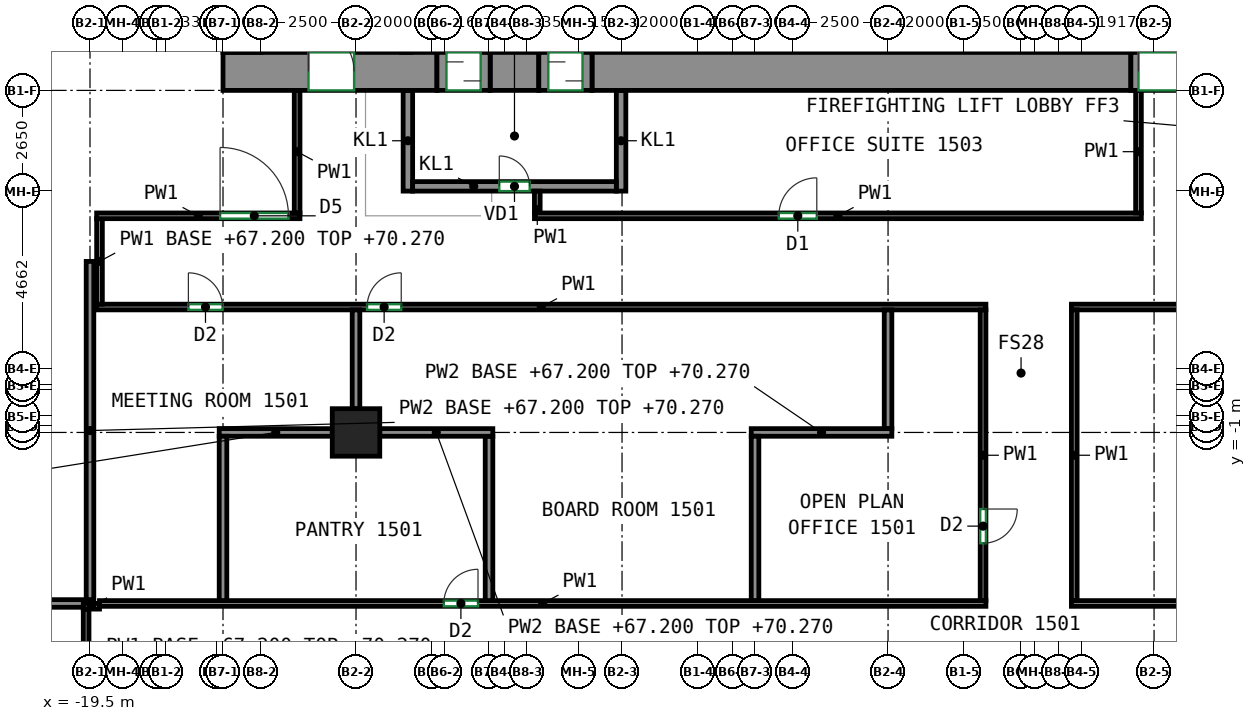
"""IFC4 building model, lengths in metres.
Left out: names, types, materials, properties, quantities, classifications, styles, units other than length and angle.
Written with IfcOpenShell. Run it as: python <this file> out.ifc"""

import sys

from ifc_helpers import new_model, si_unit, direction, frame, frame_2d, origin, origin_2d, place, context, subcontext, project, spatial, rectangle, extrude, source, transform, mapped, element, fill, save


model = new_model("IFC4")
c1 = context("Model", 3, precision=1e-05, world=origin(), true_north=direction((0.0, 1.0)))
c2 = subcontext(c1, "Body", "Model", "MODEL_VIEW")
j1 = project(units=[si_unit("LENGTHUNIT", "METRE"), si_unit("PLANEANGLEUNIT", "RADIAN")], contexts=[c1])
p1 = place(None, origin())
s1 = spatial("IfcSite", under=j1, at=p1, CompositionType="ELEMENT")
p2 = place(p1, origin())
s2 = spatial("IfcBuilding", under=s1, at=p2, CompositionType="ELEMENT")
p3 = place(p2, frame((0.0, 0.0, 67.2)))
s3 = spatial("IfcBuildingStorey", under=s2, at=p3, CompositionType="ELEMENT", Elevation=67.2)
m1 = source(origin(), c2, "Body", "SweptSolid", [
    extrude(rectangle(XDim=1.25, YDim=1.25, at=origin_2d()), origin(), (0.0, 0.0, 1.0), 3.72),
])
p4 = place(p3, frame((-12.5, -1.0, 0.0), z_axis=(0.0, 0.0, 1.0), x_axis=(1.0, 0.0, 0.0)))
e1 = element("IfcColumn", 1, at=p4, inside=s3, PredefinedType="COLUMN", context=c2, shape_type="MappedRepresentation", body=[
    mapped(m1, transform((0.0, 0.0, 0.0))),
])
m2 = source(origin(), c2, "Body", "SweptSolid", [
    extrude(rectangle(XDim=5.63, YDim=1.0, at=frame_2d((2.815, 0.0))), origin(), (0.0, 0.0, 1.0), 3.72),
])
p5 = place(p3, frame((-16.0, 8.5, 0.0), z_axis=(0.0, 0.0, 1.0), x_axis=(1.0, 0.0, 0.0)))
e2 = element("IfcWall", 2, at=p5, inside=s3, PredefinedType="SHEAR", context=c2, shape_type="MappedRepresentation", body=[
    mapped(m2, transform((0.0, 0.0, 0.0))),
])
p6 = place(p5, frame((2.25, 0.0, 0.0)))
e3 = element("IfcOpeningElement", 3, at=p6, cuts=e2, PredefinedType="OPENING", context=c2, shape_type="SweptSolid", body=[
    extrude(rectangle(XDim=1.2, YDim=2.1, at=frame_2d((0.6, 1.05))), frame((0.0, 0.51, 0.0), z_axis=(0.0, -1.0, 0.0), x_axis=(1.0, 0.0, 0.0)), (0.0, 0.0, 1.0), 1.02),
])
m3 = source(origin(), c2, "Body", "SweptSolid", [
    extrude(rectangle(XDim=1.28, YDim=1.0, at=frame_2d((0.64, 0.0))), origin(), (0.0, 0.0, 1.0), 3.72),
])
p7 = place(p3, frame((-8.97, 8.5, 0.0), z_axis=(0.0, 0.0, 1.0), x_axis=(1.0, 0.0, 0.0)))
e4 = element("IfcWall", 4, at=p7, inside=s3, PredefinedType="SHEAR", context=c2, shape_type="MappedRepresentation", body=[
    mapped(m3, transform((0.0, 0.0, 0.0))),
])
m4 = source(origin(), c2, "Body", "SweptSolid", [
    extrude(rectangle(XDim=14.18, YDim=1.0, at=frame_2d((7.09, 0.0))), origin(), (0.0, 0.0, 1.0), 3.72),
])
p8 = place(p3, frame((-6.29, 8.5, 0.0), z_axis=(0.0, 0.0, 1.0), x_axis=(1.0, 0.0, 0.0)))
e5 = element("IfcWall", 5, at=p8, inside=s3, PredefinedType="SHEAR", context=c2, shape_type="MappedRepresentation", body=[
    mapped(m4, transform((0.0, 0.0, 0.0))),
])
m5 = source(origin(), c2, "Body", "SweptSolid", [
    extrude(rectangle(XDim=2.65, YDim=0.25, at=frame_2d((1.325, 0.0))), origin(), (0.0, 0.0, 1.0), 3.72),
])
for number, where, z_axis, x_axis in (
    (6, (-11.135, 5.35, 0.0), (0.0, 0.0, 1.0), (0.0, 1.0, 0.0)),
    (7, (-5.525, 5.35, 0.0), (0.0, 0.0, 1.0), (0.0, 1.0, 0.0)),
):
    element("IfcWall", number, at=place(p3, frame(where, z_axis=z_axis, x_axis=x_axis)), inside=s3, PredefinedType="PARTITIONING", context=c2, shape_type="MappedRepresentation", body=[
        mapped(m5, transform((0.0, 0.0, 0.0))),
    ])
m6 = source(origin(), c2, "Body", "SweptSolid", [
    extrude(rectangle(XDim=5.36, YDim=0.25, at=frame_2d((2.68, 0.0))), origin(), (0.0, 0.0, 1.0), 3.72),
])
p9 = place(p3, frame((-11.01, 5.475, 0.0), z_axis=(0.0, 0.0, 1.0), x_axis=(1.0, 0.0, 0.0)))
e8 = element("IfcWall", 8, at=p9, inside=s3, PredefinedType="PARTITIONING", context=c2, shape_type="MappedRepresentation", body=[
    mapped(m6, transform((0.0, 0.0, 0.0))),
])
p10 = place(p9, frame((2.28, 0.0, 0.0)))
e9 = element("IfcOpeningElement", 9, at=p10, cuts=e8, PredefinedType="OPENING", context=c2, shape_type="SweptSolid", body=[
    extrude(rectangle(XDim=0.8, YDim=2.0, at=frame_2d((0.4, 1.0))), frame((0.0, 0.135, 0.0), z_axis=(0.0, -1.0, 0.0), x_axis=(1.0, 0.0, 0.0)), (0.0, 0.0, 1.0), 0.27),
])
m7 = source(origin(), c2, "Body", "SweptSolid", [
    extrude(rectangle(XDim=1.4, YDim=1.0, at=frame_2d((0.7, 0.0))), origin(), (0.0, 0.0, 1.0), 2.7),
])
p11 = place(p3, frame((-10.37, 8.5, 0.0), z_axis=(0.0, 0.0, 1.0), x_axis=(1.0, 0.0, 0.0)))
e10 = element("IfcWall", 10, at=p11, inside=s3, PredefinedType="PARTITIONING", context=c2, shape_type="MappedRepresentation", body=[
    mapped(m7, transform((0.0, 0.0, 0.0))),
])
p12 = place(p11, frame((0.25, 0.0, 0.0)))
e11 = element("IfcOpeningElement", 11, at=p12, cuts=e10, PredefinedType="OPENING", context=c2, shape_type="SweptSolid", body=[
    extrude(rectangle(XDim=0.9, YDim=2.1, at=frame_2d((0.45, 1.05))), frame((0.0, 0.51, 0.0), z_axis=(0.0, -1.0, 0.0), x_axis=(1.0, 0.0, 0.0)), (0.0, 0.0, 1.0), 1.02),
])
m8 = source(origin(), c2, "Body", "SweptSolid", [
    extrude(rectangle(XDim=1.4, YDim=1.0, at=frame_2d((0.7, 0.0))), origin(), (0.0, 0.0, 1.0), 2.7),
])
p13 = place(p3, frame((-7.69, 8.5, 0.0), z_axis=(0.0, 0.0, 1.0), x_axis=(1.0, 0.0, 0.0)))
e12 = element("IfcWall", 12, at=p13, inside=s3, PredefinedType="PARTITIONING", context=c2, shape_type="MappedRepresentation", body=[
    mapped(m8, transform((0.0, 0.0, 0.0))),
])
p14 = place(p13, frame((0.25, 0.0, 0.0)))
e13 = element("IfcOpeningElement", 13, at=p14, cuts=e12, PredefinedType="OPENING", context=c2, shape_type="SweptSolid", body=[
    extrude(rectangle(XDim=0.9, YDim=2.1, at=frame_2d((0.45, 1.05))), frame((0.0, 0.51, 0.0), z_axis=(0.0, -1.0, 0.0), x_axis=(1.0, 0.0, 0.0)), (0.0, 0.0, 1.0), 1.02),
])
m9 = source(origin(), c2, "Body", "SweptSolid", [
    extrude(rectangle(XDim=2.4, YDim=1.0, at=frame_2d((1.2, 0.0))), origin(), (0.0, 0.0, 1.0), 2.7),
])
p15 = place(p3, frame((7.89, 8.5, 0.0), z_axis=(0.0, 0.0, 1.0), x_axis=(1.0, 0.0, 0.0)))
e14 = element("IfcWall", 14, at=p15, inside=s3, PredefinedType="PARTITIONING", context=c2, shape_type="MappedRepresentation", body=[
    mapped(m9, transform((0.0, 0.0, 0.0))),
])
p16 = place(p15, frame((0.2, 0.0, 0.0)))
e15 = element("IfcOpeningElement", 15, at=p16, cuts=e14, PredefinedType="OPENING", context=c2, shape_type="SweptSolid", body=[
    extrude(rectangle(XDim=2.0, YDim=2.1, at=frame_2d((1.0, 1.05))), frame((0.0, 0.51, 0.0), z_axis=(0.0, -1.0, 0.0), x_axis=(1.0, 0.0, 0.0)), (0.0, 0.0, 1.0), 1.02),
])
p17 = place(p3, frame((-19.25, -5.573, 0.0), z_axis=(0.0, 0.0, 1.0), x_axis=(-1.0, 0.0, 0.0)))
e16 = element("IfcWall", 16, at=p17, inside=s3, PredefinedType="PARTITIONING", context=c2, shape_type="SweptSolid", body=[
    extrude(rectangle(XDim=0.427, YDim=0.15, at=frame_2d((0.213, 0.0))), origin(), (0.0, 0.0, 1.0), 3.72),
])
p18 = place(p3, frame((-19.602, -7.652, 0.0), z_axis=(0.0, 0.0, 1.0), x_axis=(0.0, 1.0, 0.0)))
e17 = element("IfcWall", 17, at=p18, inside=s3, PredefinedType="PARTITIONING", context=c2, shape_type="SweptSolid", body=[
    extrude(rectangle(XDim=2.004, YDim=0.15, at=frame_2d((1.002, 0.0))), origin(), (0.0, 0.0, 1.0), 3.07),
])
p19 = place(p3, frame((-19.25, -5.5, 0.0), z_axis=(0.0, 0.0, 1.0), x_axis=(1.0, 0.0, 0.0)))
e18 = element("IfcWall", 18, at=p19, inside=s3, PredefinedType="PARTITIONING", context=c2, shape_type="SweptSolid", body=[
    extrude(rectangle(XDim=23.325, YDim=0.15, at=frame_2d((11.663, 0.0))), origin(), (0.0, 0.0, 1.0), 3.72),
])
p20 = place(p19, frame((9.06, 0.0, 0.0)))
e19 = element("IfcOpeningElement", 19, at=p20, cuts=e18, PredefinedType="OPENING", context=c2, shape_type="SweptSolid", body=[
    extrude(rectangle(XDim=0.9, YDim=2.1, at=frame_2d((0.45, 1.05))), frame((0.0, 0.085, 0.0), z_axis=(0.0, -1.0, 0.0), x_axis=(1.0, 0.0, 0.0)), (0.0, 0.0, 1.0), 0.17),
])
p21 = place(p3, frame((-19.325, 2.3, 0.0), z_axis=(0.0, 0.0, 1.0), x_axis=(1.0, 0.0, 0.0)))
e20 = element("IfcWall", 20, at=p21, inside=s3, PredefinedType="PARTITIONING", context=c2, shape_type="SweptSolid", body=[
    extrude(rectangle(XDim=23.4, YDim=0.15, at=frame_2d((11.7, 0.0))), origin(), (0.0, 0.0, 1.0), 3.72),
])
p22 = place(p21, frame((2.414, 0.0, 0.0)))
e21 = element("IfcOpeningElement", 21, at=p22, cuts=e20, PredefinedType="OPENING", context=c2, shape_type="SweptSolid", body=[
    extrude(rectangle(XDim=0.9, YDim=2.1, at=frame_2d((0.45, 1.05))), frame((0.0, 0.085, 0.0), z_axis=(0.0, -1.0, 0.0), x_axis=(1.0, 0.0, 0.0)), (0.0, 0.0, 1.0), 0.17),
])
p23 = place(p21, frame((7.115, 0.0, 0.0)))
e22 = element("IfcOpeningElement", 22, at=p23, cuts=e20, PredefinedType="OPENING", context=c2, shape_type="SweptSolid", body=[
    extrude(rectangle(XDim=0.9, YDim=2.1, at=frame_2d((0.45, 1.05))), frame((0.0, 0.085, 0.0), z_axis=(0.0, -1.0, 0.0), x_axis=(1.0, 0.0, 0.0)), (0.0, 0.0, 1.0), 0.17),
])
p24 = place(p3, frame((-19.25, 2.375, 0.0), z_axis=(0.0, 0.0, 1.0), x_axis=(0.0, 1.0, 0.0)))
e23 = element("IfcWall", 23, at=p24, inside=s3, PredefinedType="PARTITIONING", context=c2, shape_type="SweptSolid", body=[
    extrude(rectangle(XDim=2.25, YDim=0.15, at=frame_2d((1.125, 0.0))), origin(), (0.0, 0.0, 1.0), 3.07),
])
p25 = place(p3, frame((-19.325, 4.7, 0.0), z_axis=(0.0, 0.0, 1.0), x_axis=(1.0, 0.0, 0.0)))
e24 = element("IfcWall", 24, at=p25, inside=s3, PredefinedType="PARTITIONING", context=c2, shape_type="SweptSolid", body=[
    extrude(rectangle(XDim=5.35, YDim=0.15, at=frame_2d((2.675, 0.0))), origin(), (0.0, 0.0, 1.0), 3.72),
])
p26 = place(p25, frame((3.248, 0.0, 0.0)))
e25 = element("IfcOpeningElement", 25, at=p26, cuts=e24, PredefinedType="OPENING", context=c2, shape_type="SweptSolid", body=[
    extrude(rectangle(XDim=1.8, YDim=2.1, at=frame_2d((0.9, 1.05))), frame((0.0, 0.085, 0.0), z_axis=(0.0, -1.0, 0.0), x_axis=(1.0, 0.0, 0.0)), (0.0, 0.0, 1.0), 0.17),
])
p27 = place(p3, frame((-14.05, 8.0, 0.0), z_axis=(0.0, 0.0, 1.0), x_axis=(0.0, -1.0, 0.0)))
e26 = element("IfcWall", 26, at=p27, inside=s3, PredefinedType="PARTITIONING", context=c2, shape_type="SweptSolid", body=[
    extrude(rectangle(XDim=3.225, YDim=0.15, at=frame_2d((1.613, 0.0))), origin(), (0.0, 0.0, 1.0), 3.72),
])
p28 = place(p3, frame((-7.73, 4.775, 0.0), z_axis=(0.0, 0.0, 1.0), x_axis=(0.0, 1.0, 0.0)))
e27 = element("IfcWall", 27, at=p28, inside=s3, PredefinedType="PARTITIONING", context=c2, shape_type="SweptSolid", body=[
    extrude(rectangle(XDim=0.575, YDim=0.15, at=frame_2d((0.288, 0.0))), origin(), (0.0, 0.0, 1.0), 3.72),
])
p29 = place(p3, frame((-7.805, 4.7, 0.0), z_axis=(0.0, 0.0, 1.0), x_axis=(1.0, 0.0, 0.0)))
e28 = element("IfcWall", 28, at=p29, inside=s3, PredefinedType="PARTITIONING", context=c2, shape_type="SweptSolid", body=[
    extrude(rectangle(XDim=15.97, YDim=0.15, at=frame_2d((7.985, 0.0))), origin(), (0.0, 0.0, 1.0), 3.72),
])
p30 = place(p29, frame((6.43, 0.0, 0.0)))
e29 = element("IfcOpeningElement", 29, at=p30, cuts=e28, PredefinedType="OPENING", context=c2, shape_type="SweptSolid", body=[
    extrude(rectangle(XDim=1.0, YDim=2.1, at=frame_2d((0.5, 1.05))), frame((0.0, 0.085, 0.0), z_axis=(0.0, -1.0, 0.0), x_axis=(1.0, 0.0, 0.0)), (0.0, 0.0, 1.0), 0.17),
])
p31 = place(p3, frame((8.09, 8.0, 0.0), z_axis=(0.0, 0.0, 1.0), x_axis=(0.0, -1.0, 0.0)))
e30 = element("IfcWall", 30, at=p31, inside=s3, PredefinedType="PARTITIONING", context=c2, shape_type="SweptSolid", body=[
    extrude(rectangle(XDim=3.225, YDim=0.15, at=frame_2d((1.613, 0.0))), origin(), (0.0, 0.0, 1.0), 3.72),
])
p32 = place(p3, frame((4.0, 2.225, 0.0), z_axis=(0.0, 0.0, 1.0), x_axis=(0.0, -1.0, 0.0)))
e31 = element("IfcWall", 31, at=p32, inside=s3, PredefinedType="PARTITIONING", context=c2, shape_type="SweptSolid", body=[
    extrude(rectangle(XDim=7.65, YDim=0.15, at=frame_2d((3.825, 0.0))), origin(), (0.0, 0.0, 1.0), 3.72),
])
p33 = place(p32, frame((5.24, 0.0, 0.0)))
e32 = element("IfcOpeningElement", 32, at=p33, cuts=e31, PredefinedType="OPENING", context=c2, shape_type="SweptSolid", body=[
    extrude(rectangle(XDim=0.9, YDim=2.1, at=frame_2d((0.45, 1.05))), frame((0.0, 0.085, 0.0), z_axis=(0.0, -1.0, 0.0), x_axis=(1.0, 0.0, 0.0)), (0.0, 0.0, 1.0), 0.17),
])
p34 = place(p3, frame((6.325, 2.3, 0.0), z_axis=(0.0, 0.0, 1.0), x_axis=(1.0, 0.0, 0.0)))
e33 = element("IfcWall", 33, at=p34, inside=s3, PredefinedType="PARTITIONING", context=c2, shape_type="SweptSolid", body=[
    extrude(rectangle(XDim=23.0, YDim=0.15, at=frame_2d((11.5, 0.0))), origin(), (0.0, 0.0, 1.0), 3.72),
])
p35 = place(p34, frame((9.443, 0.0, 0.0)))
e34 = element("IfcOpeningElement", 34, at=p35, cuts=e33, PredefinedType="OPENING", context=c2, shape_type="SweptSolid", body=[
    extrude(rectangle(XDim=1.0, YDim=2.1, at=frame_2d((0.5, 1.05))), frame((0.0, 0.085, 0.0), z_axis=(0.0, -1.0, 0.0), x_axis=(1.0, 0.0, 0.0)), (0.0, 0.0, 1.0), 0.17),
])
p36 = place(p34, frame((20.381, 0.0, 0.0)))
e35 = element("IfcOpeningElement", 35, at=p36, cuts=e33, PredefinedType="OPENING", context=c2, shape_type="SweptSolid", body=[
    extrude(rectangle(XDim=1.8, YDim=2.1, at=frame_2d((0.9, 1.05))), frame((0.0, 0.085, 0.0), z_axis=(0.0, -1.0, 0.0), x_axis=(1.0, 0.0, 0.0)), (0.0, 0.0, 1.0), 0.17),
])
p37 = place(p3, frame((6.4, -5.425, 0.0), z_axis=(0.0, 0.0, 1.0), x_axis=(0.0, 1.0, 0.0)))
e36 = element("IfcWall", 36, at=p37, inside=s3, PredefinedType="PARTITIONING", context=c2, shape_type="SweptSolid", body=[
    extrude(rectangle(XDim=7.65, YDim=0.15, at=frame_2d((3.825, 0.0))), origin(), (0.0, 0.0, 1.0), 3.72),
])
p38 = place(p3, frame((6.325, -5.5, 0.0), z_axis=(0.0, 0.0, 1.0), x_axis=(1.0, 0.0, 0.0)))
e37 = element("IfcWall", 37, at=p38, inside=s3, PredefinedType="PARTITIONING", context=c2, shape_type="SweptSolid", body=[
    extrude(rectangle(XDim=23.0, YDim=0.15, at=frame_2d((11.5, 0.0))), origin(), (0.0, 0.0, 1.0), 3.72),
])
p39 = place(p3, frame((-19.677, -5.5, 0.0), z_axis=(0.0, 0.0, 1.0), x_axis=(-1.0, 0.0, 0.0)))
e38 = element("IfcWall", 38, at=p39, inside=s3, PredefinedType="PARTITIONING", context=c2, shape_type="SweptSolid", body=[
    extrude(rectangle(XDim=3.073, YDim=0.2, at=frame_2d((1.537, 0.0))), origin(), (0.0, 0.0, 1.0), 3.72),
])
p40 = place(p3, frame((-19.5, 3.5, 0.0), z_axis=(0.0, 0.0, 1.0), x_axis=(0.0, -1.0, 0.0)))
e39 = element("IfcWall", 39, at=p40, inside=s3, PredefinedType="PARTITIONING", context=c2, shape_type="SweptSolid", body=[
    extrude(rectangle(XDim=8.9, YDim=0.2, at=frame_2d((4.45, 0.0))), origin(), (0.0, 0.0, 1.0), 3.07),
])
p41 = place(p3, frame((-16.1, -1.0, 0.0), z_axis=(0.0, 0.0, 1.0), x_axis=(1.0, 0.0, 0.0)))
e40 = element("IfcWall", 40, at=p41, inside=s3, PredefinedType="PARTITIONING", context=c2, shape_type="SweptSolid", body=[
    extrude(rectangle(XDim=2.975, YDim=0.2, at=frame_2d((1.488, 0.0))), origin(), (0.0, 0.0, 1.0), 3.07),
])
p42 = place(p3, frame((-16.0, -5.424, 0.0), z_axis=(0.0, 0.0, 1.0), x_axis=(0.0, 1.0, 0.0)))
e41 = element("IfcWall", 41, at=p42, inside=s3, PredefinedType="PARTITIONING", context=c2, shape_type="SweptSolid", body=[
    extrude(rectangle(XDim=4.324, YDim=0.2, at=frame_2d((2.162, 0.0))), origin(), (0.0, 0.0, 1.0), 3.72),
])
p43 = place(p3, frame((-12.5, -0.375, 0.0), z_axis=(0.0, 0.0, 1.0), x_axis=(0.0, 1.0, 0.0)))
e42 = element("IfcWall", 42, at=p43, inside=s3, PredefinedType="PARTITIONING", context=c2, shape_type="SweptSolid", body=[
    extrude(rectangle(XDim=2.599, YDim=0.2, at=frame_2d((1.3, 0.0))), origin(), (0.0, 0.0, 1.0), 3.72),
])
p44 = place(p3, frame((-9.0, -5.424, 0.0), z_axis=(0.0, 0.0, 1.0), x_axis=(0.0, 1.0, 0.0)))
e43 = element("IfcWall", 43, at=p44, inside=s3, PredefinedType="PARTITIONING", context=c2, shape_type="SweptSolid", body=[
    extrude(rectangle(XDim=4.324, YDim=0.2, at=frame_2d((2.162, 0.0))), origin(), (0.0, 0.0, 1.0), 3.72),
])
p45 = place(p3, frame((-11.875, -1.0, 0.0), z_axis=(0.0, 0.0, 1.0), x_axis=(1.0, 0.0, 0.0)))
e44 = element("IfcWall", 44, at=p45, inside=s3, PredefinedType="PARTITIONING", context=c2, shape_type="SweptSolid", body=[
    extrude(rectangle(XDim=2.975, YDim=0.2, at=frame_2d((1.488, 0.0))), origin(), (0.0, 0.0, 1.0), 3.07),
])
p46 = place(p3, frame((1.5, -0.9, 0.0), z_axis=(0.0, 0.0, 1.0), x_axis=(0.0, 1.0, 0.0)))
e45 = element("IfcWall", 45, at=p46, inside=s3, PredefinedType="PARTITIONING", context=c2, shape_type="SweptSolid", body=[
    extrude(rectangle(XDim=3.124, YDim=0.2, at=frame_2d((1.562, 0.0))), origin(), (0.0, 0.0, 1.0), 3.72),
])
p47 = place(p3, frame((-2.1, -1.0, 0.0), z_axis=(0.0, 0.0, 1.0), x_axis=(1.0, 0.0, 0.0)))
e46 = element("IfcWall", 46, at=p47, inside=s3, PredefinedType="PARTITIONING", context=c2, shape_type="SweptSolid", body=[
    extrude(rectangle(XDim=3.7, YDim=0.2, at=frame_2d((1.85, 0.0))), origin(), (0.0, 0.0, 1.0), 3.07),
])
p48 = place(p3, frame((-2.0, -5.424, 0.0), z_axis=(0.0, 0.0, 1.0), x_axis=(0.0, 1.0, 0.0)))
e47 = element("IfcWall", 47, at=p48, inside=s3, PredefinedType="PARTITIONING", context=c2, shape_type="SweptSolid", body=[
    extrude(rectangle(XDim=4.324, YDim=0.2, at=frame_2d((2.162, 0.0))), origin(), (0.0, 0.0, 1.0), 3.72),
])
p49 = place(p16, origin())
e48 = element("IfcDoor", 48, at=p49, inside=s3, OperationType="DOUBLE_DOOR_SINGLE_SWING", PredefinedType="DOOR", context=c2, shape_type="SweptSolid", body=[
    extrude(rectangle(XDim=2.0, YDim=2.1, at=frame_2d((1.0, 1.05))), frame((0.0, 0.405, 0.0), z_axis=(0.0, -1.0, 0.0), x_axis=(1.0, 0.0, 0.0)), (0.0, 0.0, 1.0), 0.05),
])
fill(e15, e48)
p50 = place(p10, origin())
e49 = element("IfcDoor", 49, at=p50, inside=s3, OperationType="SINGLE_SWING_LEFT", PredefinedType="DOOR", context=c2, shape_type="SweptSolid", body=[
    extrude(rectangle(XDim=0.8, YDim=2.0, at=frame_2d((0.4, 1.0))), frame((0.0, 0.025, 0.0), z_axis=(0.0, -1.0, 0.0), x_axis=(1.0, 0.0, 0.0)), (0.0, 0.0, 1.0), 0.05),
])
fill(e9, e49)
p51 = place(p12, origin())
e50 = element("IfcDoor", 50, at=p51, inside=s3, OperationType="SLIDING_TO_LEFT", PredefinedType="DOOR", context=c2, shape_type="SweptSolid", body=[
    extrude(rectangle(XDim=0.9, YDim=2.1, at=frame_2d((0.45, 1.05))), frame((0.0, 0.405, 0.0), z_axis=(0.0, -1.0, 0.0), x_axis=(1.0, 0.0, 0.0)), (0.0, 0.0, 1.0), 0.05),
])
fill(e11, e50)
p52 = place(p14, origin())
e51 = element("IfcDoor", 51, at=p52, inside=s3, OperationType="SLIDING_TO_RIGHT", PredefinedType="DOOR", context=c2, shape_type="SweptSolid", body=[
    extrude(rectangle(XDim=0.9, YDim=2.1, at=frame_2d((0.45, 1.05))), frame((0.0, 0.405, 0.0), z_axis=(0.0, -1.0, 0.0), x_axis=(1.0, 0.0, 0.0)), (0.0, 0.0, 1.0), 0.05),
])
fill(e13, e51)
p53 = place(p6, origin())
e52 = element("IfcDoor", 52, at=p53, inside=s3, OperationType="DOUBLE_DOOR_SINGLE_SWING", PredefinedType="DOOR", context=c2, shape_type="SweptSolid", body=[
    extrude(rectangle(XDim=1.2, YDim=2.1, at=frame_2d((0.6, 1.05))), frame((0.0, 0.405, 0.0), z_axis=(0.0, -1.0, 0.0), x_axis=(1.0, 0.0, 0.0)), (0.0, 0.0, 1.0), 0.05),
])
fill(e3, e52)
p54 = place(p20, origin())
e53 = element("IfcDoor", 53, at=p54, inside=s3, OperationType="SINGLE_SWING_RIGHT", PredefinedType="DOOR", context=c2, shape_type="SweptSolid", body=[
    extrude(rectangle(XDim=0.9, YDim=2.1, at=frame_2d((0.45, 1.05))), frame((0.0, 0.025, 0.0), z_axis=(0.0, -1.0, 0.0), x_axis=(1.0, 0.0, 0.0)), (0.0, 0.0, 1.0), 0.05),
])
fill(e19, e53)
p55 = place(p33, origin())
e54 = element("IfcDoor", 54, at=p55, inside=s3, OperationType="SINGLE_SWING_LEFT", PredefinedType="DOOR", context=c2, shape_type="SweptSolid", body=[
    extrude(rectangle(XDim=0.9, YDim=2.1, at=frame_2d((0.45, 1.05))), frame((0.0, 0.025, 0.0), z_axis=(0.0, -1.0, 0.0), x_axis=(1.0, 0.0, 0.0)), (0.0, 0.0, 1.0), 0.05),
])
fill(e32, e54)
p56 = place(p22, origin())
e55 = element("IfcDoor", 55, at=p56, inside=s3, OperationType="SINGLE_SWING_LEFT", PredefinedType="DOOR", context=c2, shape_type="SweptSolid", body=[
    extrude(rectangle(XDim=0.9, YDim=2.1, at=frame_2d((0.45, 1.05))), frame((0.0, 0.025, 0.0), z_axis=(0.0, -1.0, 0.0), x_axis=(1.0, 0.0, 0.0)), (0.0, 0.0, 1.0), 0.05),
])
fill(e21, e55)
p57 = place(p23, origin())
e56 = element("IfcDoor", 56, at=p57, inside=s3, OperationType="SINGLE_SWING_RIGHT", PredefinedType="DOOR", context=c2, shape_type="SweptSolid", body=[
    extrude(rectangle(XDim=0.9, YDim=2.1, at=frame_2d((0.45, 1.05))), frame((0.0, 0.025, 0.0), z_axis=(0.0, -1.0, 0.0), x_axis=(1.0, 0.0, 0.0)), (0.0, 0.0, 1.0), 0.05),
])
fill(e22, e56)
p58 = place(p26, origin())
e57 = element("IfcDoor", 57, at=p58, inside=s3, OperationType="DOUBLE_DOOR_SINGLE_SWING", PredefinedType="DOOR", context=c2, shape_type="SweptSolid", body=[
    extrude(rectangle(XDim=1.8, YDim=2.1, at=frame_2d((0.9, 1.05))), frame((0.0, 0.025, 0.0), z_axis=(0.0, -1.0, 0.0), x_axis=(1.0, 0.0, 0.0)), (0.0, 0.0, 1.0), 0.05),
])
fill(e25, e57)
p59 = place(p30, origin())
e58 = element("IfcDoor", 58, at=p59, inside=s3, OperationType="SINGLE_SWING_RIGHT", PredefinedType="DOOR", context=c2, shape_type="SweptSolid", body=[
    extrude(rectangle(XDim=1.0, YDim=2.1, at=frame_2d((0.5, 1.05))), frame((0.0, 0.025, 0.0), z_axis=(0.0, -1.0, 0.0), x_axis=(1.0, 0.0, 0.0)), (0.0, 0.0, 1.0), 0.05),
])
fill(e29, e58)
save(model, sys.argv[1])
